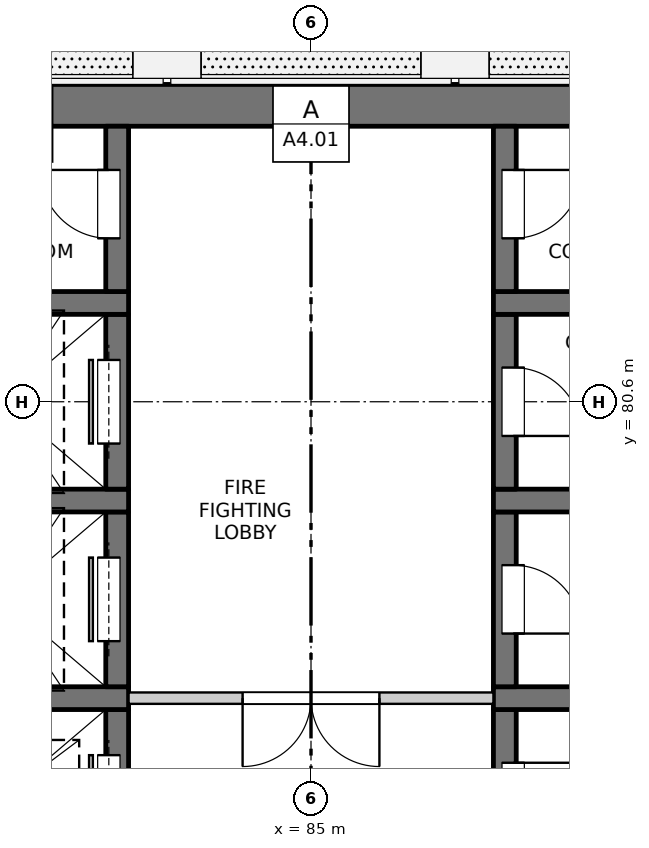
"""IFC4 building model, lengths in metres.
Left out: names, types, materials, properties, quantities, classifications, styles, units other than length and angle.
Written with IfcOpenShell. Run it as: python <this file> out.ifc"""

import sys

from ifc_helpers import new_model, si_unit, direction, frame, frame_2d, origin, place, context, subcontext, project, spatial, rectangle, extrude, element, fill, save


model = new_model("IFC4")
c1 = context("Model", 3, precision=1e-05, world=origin(), true_north=direction((0.0, 1.0)))
c2 = subcontext(c1, "Body", "Model", "MODEL_VIEW")
j1 = project(units=[si_unit("LENGTHUNIT", "METRE"), si_unit("PLANEANGLEUNIT", "RADIAN")], contexts=[c1])
p1 = place(None, origin())
s1 = spatial("IfcSite", under=j1, at=p1, CompositionType="ELEMENT")
p2 = place(p1, origin())
s2 = spatial("IfcBuilding", under=s1, at=p2, CompositionType="ELEMENT")
p3 = place(p2, frame((0.0, 0.0, 103.3)))
s3 = spatial("IfcBuildingStorey", under=s2, at=p3, CompositionType="ELEMENT", Elevation=103.3)
p4 = place(p3, frame((75.525, 84.5, -0.25), z_axis=(0.0, 0.0, 1.0), x_axis=(1.0, 0.0, 0.0)))
e1 = element("IfcWall", 1, at=p4, inside=s3, PredefinedType="SOLIDWALL", context=c2, shape_type="SweptSolid", body=[
    extrude(rectangle(XDim=18.95, YDim=0.55, at=frame_2d((9.475, 0.0))), origin(), (0.0, 0.0, 1.0), 3.4),
])
p5 = place(p3, frame((82.45, 74.25, -0.25), z_axis=(0.0, 0.0, 1.0), x_axis=(0.0, 1.0, 0.0)))
e2 = element("IfcWall", 2, at=p5, inside=s3, PredefinedType="SOLIDWALL", context=c2, shape_type="SweptSolid", body=[
    extrude(rectangle(XDim=2.3, YDim=0.3, at=frame_2d((1.15, 0.0))), origin(), (0.0, 0.0, 1.0), 3.4),
])
p6 = place(p5, frame((0.6, 0.0, 0.25)))
e3 = element("IfcOpeningElement", 3, at=p6, cuts=e2, PredefinedType="OPENING", context=c2, shape_type="SweptSolid", body=[
    extrude(rectangle(XDim=1.1, YDim=2.1, at=frame_2d((0.55, 1.05))), frame((0.0, 0.16, 0.0), z_axis=(0.0, -1.0, 0.0), x_axis=(1.0, 0.0, 0.0)), (0.0, 0.0, 1.0), 0.32),
])
p7 = place(p3, frame((79.6, 76.7, -0.25), z_axis=(0.0, 0.0, 1.0), x_axis=(1.0, 0.0, 0.0)))
e4 = element("IfcWall", 4, at=p7, inside=s3, PredefinedType="SOLIDWALL", context=c2, shape_type="SweptSolid", body=[
    extrude(rectangle(XDim=3.0, YDim=0.3, at=frame_2d((1.5, 0.0))), origin(), (0.0, 0.0, 1.0), 3.4),
])
p8 = place(p3, frame((82.45, 76.85, -0.25), z_axis=(0.0, 0.0, 1.0), x_axis=(0.0, 1.0, 0.0)))
e5 = element("IfcWall", 5, at=p8, inside=s3, PredefinedType="SOLIDWALL", context=c2, shape_type="SweptSolid", body=[
    extrude(rectangle(XDim=2.3, YDim=0.3, at=frame_2d((1.15, 0.0))), origin(), (0.0, 0.0, 1.0), 3.4),
])
p9 = place(p8, frame((0.6, 0.0, 0.25)))
e6 = element("IfcOpeningElement", 6, at=p9, cuts=e5, PredefinedType="OPENING", context=c2, shape_type="SweptSolid", body=[
    extrude(rectangle(XDim=1.1, YDim=2.1, at=frame_2d((0.55, 1.05))), frame((0.0, 0.16, 0.0), z_axis=(0.0, -1.0, 0.0), x_axis=(1.0, 0.0, 0.0)), (0.0, 0.0, 1.0), 0.32),
])
p10 = place(p3, frame((79.6, 79.3, -0.25), z_axis=(0.0, 0.0, 1.0), x_axis=(1.0, 0.0, 0.0)))
e7 = element("IfcWall", 7, at=p10, inside=s3, PredefinedType="SOLIDWALL", context=c2, shape_type="SweptSolid", body=[
    extrude(rectangle(XDim=3.0, YDim=0.3, at=frame_2d((1.5, 0.0))), origin(), (0.0, 0.0, 1.0), 3.4),
])
p11 = place(p3, frame((82.45, 79.45, -0.25), z_axis=(0.0, 0.0, 1.0), x_axis=(0.0, 1.0, 0.0)))
e8 = element("IfcWall", 8, at=p11, inside=s3, PredefinedType="SOLIDWALL", context=c2, shape_type="SweptSolid", body=[
    extrude(rectangle(XDim=2.3, YDim=0.3, at=frame_2d((1.15, 0.0))), origin(), (0.0, 0.0, 1.0), 3.4),
])
p12 = place(p11, frame((0.6, 0.0, 0.25)))
e9 = element("IfcOpeningElement", 9, at=p12, cuts=e8, PredefinedType="OPENING", context=c2, shape_type="SweptSolid", body=[
    extrude(rectangle(XDim=1.1, YDim=2.1, at=frame_2d((0.55, 1.05))), frame((0.0, 0.16, 0.0), z_axis=(0.0, -1.0, 0.0), x_axis=(1.0, 0.0, 0.0)), (0.0, 0.0, 1.0), 0.32),
])
p13 = place(p3, frame((79.6, 81.9, -0.25), z_axis=(0.0, 0.0, 1.0), x_axis=(1.0, 0.0, 0.0)))
e10 = element("IfcWall", 10, at=p13, inside=s3, PredefinedType="SOLIDWALL", context=c2, shape_type="SweptSolid", body=[
    extrude(rectangle(XDim=3.0, YDim=0.3, at=frame_2d((1.5, 0.0))), origin(), (0.0, 0.0, 1.0), 3.4),
])
p14 = place(p3, frame((82.45, 82.05, -0.25), z_axis=(0.0, 0.0, 1.0), x_axis=(0.0, 1.0, 0.0)))
e11 = element("IfcWall", 11, at=p14, inside=s3, PredefinedType="SOLIDWALL", context=c2, shape_type="SweptSolid", body=[
    extrude(rectangle(XDim=2.175, YDim=0.3, at=frame_2d((1.087, 0.0))), origin(), (0.0, 0.0, 1.0), 3.4),
])
p15 = place(p14, frame((0.7, 0.0, 0.25)))
e12 = element("IfcOpeningElement", 12, at=p15, cuts=e11, PredefinedType="OPENING", context=c2, shape_type="SweptSolid", body=[
    extrude(rectangle(XDim=0.9, YDim=2.1, at=frame_2d((0.45, 1.05))), frame((0.0, 0.16, 0.0), z_axis=(0.0, -1.0, 0.0), x_axis=(1.0, 0.0, 0.0)), (0.0, 0.0, 1.0), 0.32),
])
p16 = place(p3, frame((87.55, 74.25, -0.25), z_axis=(0.0, 0.0, 1.0), x_axis=(0.0, 1.0, 0.0)))
e13 = element("IfcWall", 13, at=p16, inside=s3, PredefinedType="SOLIDWALL", context=c2, shape_type="SweptSolid", body=[
    extrude(rectangle(XDim=2.3, YDim=0.3, at=frame_2d((1.15, 0.0))), origin(), (0.0, 0.0, 1.0), 3.4),
])
p17 = place(p16, frame((0.7, 0.0, 0.25)))
e14 = element("IfcOpeningElement", 14, at=p17, cuts=e13, PredefinedType="OPENING", context=c2, shape_type="SweptSolid", body=[
    extrude(rectangle(XDim=0.9, YDim=2.1, at=frame_2d((0.45, 1.05))), frame((0.0, 0.16, 0.0), z_axis=(0.0, -1.0, 0.0), x_axis=(1.0, 0.0, 0.0)), (0.0, 0.0, 1.0), 0.32),
])
p18 = place(p3, frame((87.4, 76.7, -0.25), z_axis=(0.0, 0.0, 1.0), x_axis=(1.0, 0.0, 0.0)))
e15 = element("IfcWall", 15, at=p18, inside=s3, PredefinedType="SOLIDWALL", context=c2, shape_type="SweptSolid", body=[
    extrude(rectangle(XDim=3.0, YDim=0.3, at=frame_2d((1.5, 0.0))), origin(), (0.0, 0.0, 1.0), 3.4),
])
p19 = place(p3, frame((87.55, 76.85, -0.25), z_axis=(0.0, 0.0, 1.0), x_axis=(0.0, 1.0, 0.0)))
e16 = element("IfcWall", 16, at=p19, inside=s3, PredefinedType="SOLIDWALL", context=c2, shape_type="SweptSolid", body=[
    extrude(rectangle(XDim=2.3, YDim=0.3, at=frame_2d((1.15, 0.0))), origin(), (0.0, 0.0, 1.0), 3.4),
])
p20 = place(p19, frame((0.7, 0.0, 0.25)))
e17 = element("IfcOpeningElement", 17, at=p20, cuts=e16, PredefinedType="OPENING", context=c2, shape_type="SweptSolid", body=[
    extrude(rectangle(XDim=0.9, YDim=2.1, at=frame_2d((0.45, 1.05))), frame((0.0, 0.16, 0.0), z_axis=(0.0, -1.0, 0.0), x_axis=(1.0, 0.0, 0.0)), (0.0, 0.0, 1.0), 0.32),
])
p21 = place(p3, frame((87.4, 79.3, -0.25), z_axis=(0.0, 0.0, 1.0), x_axis=(1.0, 0.0, 0.0)))
e18 = element("IfcWall", 18, at=p21, inside=s3, PredefinedType="SOLIDWALL", context=c2, shape_type="SweptSolid", body=[
    extrude(rectangle(XDim=3.0, YDim=0.3, at=frame_2d((1.5, 0.0))), origin(), (0.0, 0.0, 1.0), 3.4),
])
p22 = place(p3, frame((87.55, 79.45, -0.25), z_axis=(0.0, 0.0, 1.0), x_axis=(0.0, 1.0, 0.0)))
e19 = element("IfcWall", 19, at=p22, inside=s3, PredefinedType="SOLIDWALL", context=c2, shape_type="SweptSolid", body=[
    extrude(rectangle(XDim=2.3, YDim=0.3, at=frame_2d((1.15, 0.0))), origin(), (0.0, 0.0, 1.0), 3.4),
])
p23 = place(p22, frame((0.7, 0.0, 0.25)))
e20 = element("IfcOpeningElement", 20, at=p23, cuts=e19, PredefinedType="OPENING", context=c2, shape_type="SweptSolid", body=[
    extrude(rectangle(XDim=0.9, YDim=2.1, at=frame_2d((0.45, 1.05))), frame((0.0, 0.16, 0.0), z_axis=(0.0, -1.0, 0.0), x_axis=(1.0, 0.0, 0.0)), (0.0, 0.0, 1.0), 0.32),
])
p24 = place(p3, frame((87.4, 81.9, -0.25), z_axis=(0.0, 0.0, 1.0), x_axis=(1.0, 0.0, 0.0)))
e21 = element("IfcWall", 21, at=p24, inside=s3, PredefinedType="SOLIDWALL", context=c2, shape_type="SweptSolid", body=[
    extrude(rectangle(XDim=3.0, YDim=0.3, at=frame_2d((1.5, 0.0))), origin(), (0.0, 0.0, 1.0), 3.4),
])
p25 = place(p3, frame((87.55, 82.05, -0.25), z_axis=(0.0, 0.0, 1.0), x_axis=(0.0, 1.0, 0.0)))
e22 = element("IfcWall", 22, at=p25, inside=s3, PredefinedType="SOLIDWALL", context=c2, shape_type="SweptSolid", body=[
    extrude(rectangle(XDim=2.175, YDim=0.3, at=frame_2d((1.087, 0.0))), origin(), (0.0, 0.0, 1.0), 3.4),
])
p26 = place(p25, frame((0.7, 0.0, 0.25)))
e23 = element("IfcOpeningElement", 23, at=p26, cuts=e22, PredefinedType="OPENING", context=c2, shape_type="SweptSolid", body=[
    extrude(rectangle(XDim=0.9, YDim=2.1, at=frame_2d((0.45, 1.05))), frame((0.0, 0.16, 0.0), z_axis=(0.0, -1.0, 0.0), x_axis=(1.0, 0.0, 0.0)), (0.0, 0.0, 1.0), 0.32),
])
p27 = place(p3, frame((82.6, 76.7, 0.0), z_axis=(0.0, 0.0, 1.0), x_axis=(1.0, 0.0, 0.0)))
e24 = element("IfcWall", 24, at=p27, inside=s3, PredefinedType="PARTITIONING", context=c2, shape_type="SweptSolid", body=[
    extrude(rectangle(XDim=4.8, YDim=0.15, at=frame_2d((2.4, 0.0))), origin(), (0.0, 0.0, 1.0), 3.15),
])
p28 = place(p27, frame((1.5, 0.0, 0.0)))
e25 = element("IfcOpeningElement", 25, at=p28, cuts=e24, PredefinedType="OPENING", context=c2, shape_type="SweptSolid", body=[
    extrude(rectangle(XDim=1.8, YDim=2.1, at=frame_2d((0.9, 1.05))), frame((0.0, 0.085, 0.0), z_axis=(0.0, -1.0, 0.0), x_axis=(1.0, 0.0, 0.0)), (0.0, 0.0, 1.0), 0.17),
])
p29 = place(p6, origin())
e26 = element("IfcDoor", 26, at=p29, inside=s3, OperationType="SLIDING_TO_LEFT", PredefinedType="DOOR", context=c2, shape_type="SweptSolid", body=[
    extrude(rectangle(XDim=1.1, YDim=2.1, at=frame_2d((0.55, 1.05))), frame((0.0, 0.135, 0.0), z_axis=(0.0, -1.0, 0.0), x_axis=(1.0, 0.0, 0.0)), (0.0, 0.0, 1.0), 0.05),
])
fill(e3, e26)
p30 = place(p17, origin())
e27 = element("IfcDoor", 27, at=p30, inside=s3, OperationType="SINGLE_SWING_LEFT", PredefinedType="DOOR", context=c2, shape_type="SweptSolid", body=[
    extrude(rectangle(XDim=0.9, YDim=2.1, at=frame_2d((0.45, 1.05))), frame((0.0, -0.085, 0.0), z_axis=(0.0, -1.0, 0.0), x_axis=(1.0, 0.0, 0.0)), (0.0, 0.0, 1.0), 0.05),
])
fill(e14, e27)
p31 = place(p28, origin())
e28 = element("IfcDoor", 28, at=p31, inside=s3, OperationType="DOUBLE_DOOR_SINGLE_SWING", PredefinedType="DOOR", context=c2, shape_type="SweptSolid", body=[
    extrude(rectangle(XDim=1.8, YDim=2.1, at=frame_2d((0.9, 1.05))), frame((0.0, 0.025, 0.0), z_axis=(0.0, -1.0, 0.0), x_axis=(1.0, 0.0, 0.0)), (0.0, 0.0, 1.0), 0.05),
])
fill(e25, e28)
p32 = place(p9, origin())
e29 = element("IfcDoor", 29, at=p32, inside=s3, OperationType="SLIDING_TO_LEFT", PredefinedType="DOOR", context=c2, shape_type="SweptSolid", body=[
    extrude(rectangle(XDim=1.1, YDim=2.1, at=frame_2d((0.55, 1.05))), frame((0.0, 0.135, 0.0), z_axis=(0.0, -1.0, 0.0), x_axis=(1.0, 0.0, 0.0)), (0.0, 0.0, 1.0), 0.05),
])
fill(e6, e29)
p33 = place(p20, origin())
e30 = element("IfcDoor", 30, at=p33, inside=s3, OperationType="SINGLE_SWING_RIGHT", PredefinedType="DOOR", context=c2, shape_type="SweptSolid", body=[
    extrude(rectangle(XDim=0.9, YDim=2.1, at=frame_2d((0.45, 1.05))), frame((0.0, -0.085, 0.0), z_axis=(0.0, -1.0, 0.0), x_axis=(1.0, 0.0, 0.0)), (0.0, 0.0, 1.0), 0.05),
])
fill(e17, e30)
p34 = place(p12, origin())
e31 = element("IfcDoor", 31, at=p34, inside=s3, OperationType="SLIDING_TO_LEFT", PredefinedType="DOOR", context=c2, shape_type="SweptSolid", body=[
    extrude(rectangle(XDim=1.1, YDim=2.1, at=frame_2d((0.55, 1.05))), frame((0.0, 0.135, 0.0), z_axis=(0.0, -1.0, 0.0), x_axis=(1.0, 0.0, 0.0)), (0.0, 0.0, 1.0), 0.05),
])
fill(e9, e31)
p35 = place(p23, origin())
e32 = element("IfcDoor", 32, at=p35, inside=s3, OperationType="SINGLE_SWING_RIGHT", PredefinedType="DOOR", context=c2, shape_type="SweptSolid", body=[
    extrude(rectangle(XDim=0.9, YDim=2.1, at=frame_2d((0.45, 1.05))), frame((0.0, -0.085, 0.0), z_axis=(0.0, -1.0, 0.0), x_axis=(1.0, 0.0, 0.0)), (0.0, 0.0, 1.0), 0.05),
])
fill(e20, e32)
p36 = place(p15, origin())
e33 = element("IfcDoor", 33, at=p36, inside=s3, OperationType="SINGLE_SWING_RIGHT", PredefinedType="DOOR", context=c2, shape_type="SweptSolid", body=[
    extrude(rectangle(XDim=0.9, YDim=2.1, at=frame_2d((0.45, 1.05))), frame((0.0, 0.135, 0.0), z_axis=(0.0, -1.0, 0.0), x_axis=(1.0, 0.0, 0.0)), (0.0, 0.0, 1.0), 0.05),
])
fill(e12, e33)
p37 = place(p26, origin())
e34 = element("IfcDoor", 34, at=p37, inside=s3, OperationType="SINGLE_SWING_LEFT", PredefinedType="DOOR", context=c2, shape_type="SweptSolid", body=[
    extrude(rectangle(XDim=0.9, YDim=2.1, at=frame_2d((0.45, 1.05))), frame((0.0, -0.085, 0.0), z_axis=(0.0, -1.0, 0.0), x_axis=(1.0, 0.0, 0.0)), (0.0, 0.0, 1.0), 0.05),
])
fill(e23, e34)
save(model, sys.argv[1])
